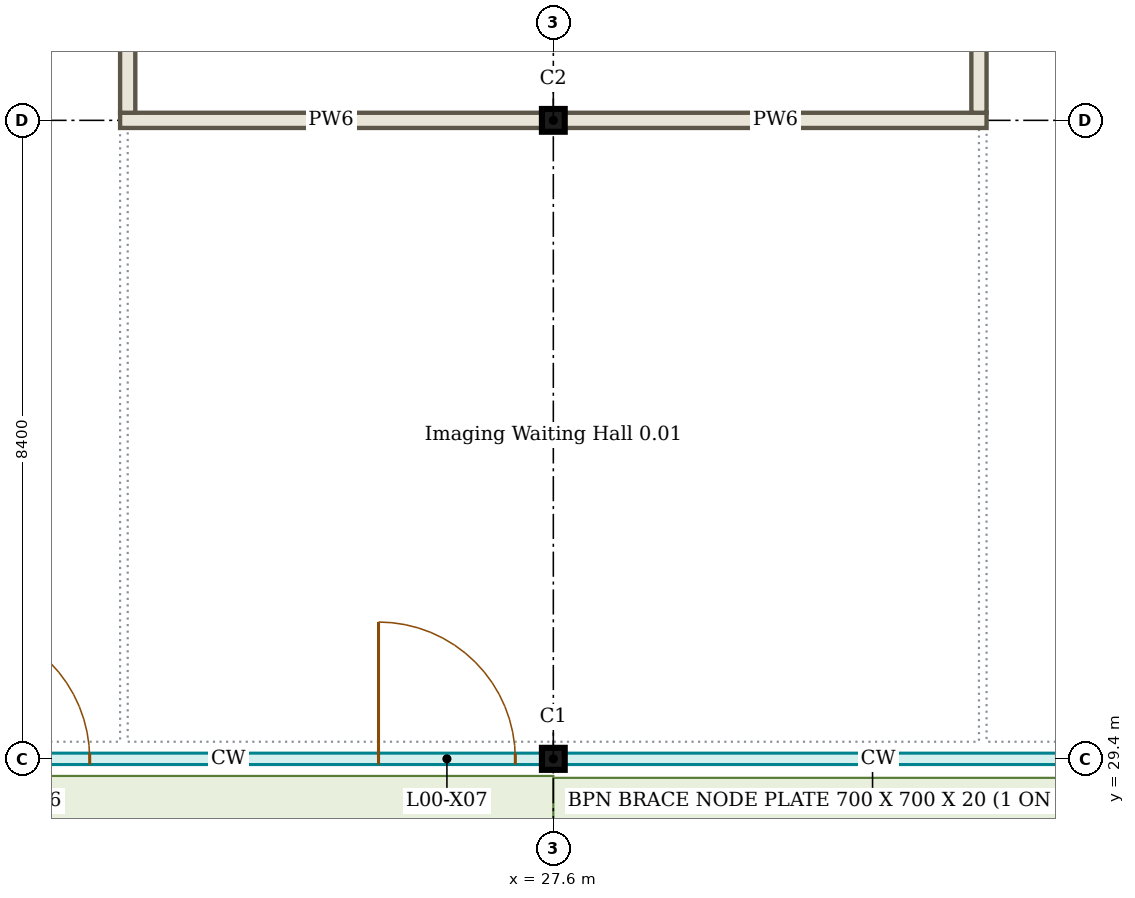
"""IFC4 building model, lengths in metres.
Left out: names, types, materials, properties, quantities, classifications, styles, units other than length and angle.
Written with IfcOpenShell. Run it as: python <this file> out.ifc"""

import sys

from ifc_helpers import new_model, si_unit, direction, frame, frame_2d, origin, origin_2d, place, context, subcontext, project, spatial, rectangle, i_section, extrude, element, save


model = new_model("IFC4")
c1 = context("Model", 3, precision=1e-05, world=origin(), true_north=direction((0.0, 1.0)))
c2 = subcontext(c1, "Body", "Model", "MODEL_VIEW")
j1 = project(units=[si_unit("LENGTHUNIT", "METRE"), si_unit("PLANEANGLEUNIT", "RADIAN")], contexts=[c1])
p1 = place(None, origin())
s1 = spatial("IfcSite", under=j1, at=p1, CompositionType="ELEMENT")
p2 = place(p1, origin())
s2 = spatial("IfcBuilding", under=s1, at=p2, CompositionType="ELEMENT")
p3 = place(p2, origin())
s3 = spatial("IfcBuildingStorey", under=s2, at=p3, CompositionType="ELEMENT", Elevation=0.0)
p4 = place(p3, frame((27.6, 29.4, 0.0), z_axis=(0.0, 0.0, 1.0), x_axis=(1.0, 0.0, 0.0)))
e1 = element("IfcColumn", 1, at=p4, inside=s3, PredefinedType="COLUMN", context=c2, shape_type="SweptSolid", body=[
    extrude(i_section(OverallWidth=0.3, OverallDepth=0.29, WebThickness=0.009, FlangeThickness=0.014, FilletRadius=0.027, at=origin_2d()), origin(), (0.0, 0.0, 1.0), 4.5),
])
p5 = place(p3, frame((27.6, 37.8, 0.0), z_axis=(0.0, 0.0, 1.0), x_axis=(1.0, 0.0, 0.0)))
e2 = element("IfcColumn", 2, at=p5, inside=s3, PredefinedType="COLUMN", context=c2, shape_type="SweptSolid", body=[
    extrude(i_section(OverallWidth=0.3, OverallDepth=0.3, WebThickness=0.011, FlangeThickness=0.019, FilletRadius=0.027, at=origin_2d()), origin(), (0.0, 0.0, 1.0), 4.5),
])
p6 = place(p3, frame((19.2, 29.24, 3.87), z_axis=(0.0, 0.0, 1.0), x_axis=(1.0, 0.0, 0.0)))
e3 = element("IfcWall", 3, at=p6, inside=s3, PredefinedType="SOLIDWALL", context=c2, shape_type="SweptSolid", body=[
    extrude(rectangle(XDim=8.4, YDim=0.13, at=frame_2d((4.2, 0.0))), origin(), (0.0, 0.0, 1.0), 0.63),
])
for number, where, z_axis, x_axis in (
    (4, (21.9, 37.8, 0.0), (0.0, 0.0, 1.0), (1.0, 0.0, 0.0)),
    (5, (27.75, 37.8, 0.0), (0.0, 0.0, 1.0), (1.0, 0.0, 0.0)),
):
    element("IfcWall", number, at=place(p3, frame(where, z_axis=z_axis, x_axis=x_axis)), inside=s3, PredefinedType="PARTITIONING", context=c2, shape_type="SweptSolid", body=[
        extrude(rectangle(XDim=5.55, YDim=0.2, at=frame_2d((2.775, 0.0))), origin(), (0.0, 0.0, 1.0), 3.8),
    ])
p7 = place(p3, frame((22.0, 37.9, 0.0), z_axis=(0.0, 0.0, 1.0), x_axis=(0.0, 1.0, 0.0)))
e6 = element("IfcWall", 6, at=p7, inside=s3, PredefinedType="PARTITIONING", context=c2, shape_type="SweptSolid", body=[
    extrude(rectangle(XDim=5.4, YDim=0.2, at=frame_2d((2.7, 0.0))), origin(), (0.0, 0.0, 1.0), 3.8),
])
p8 = place(p7, frame((2.1, 0.0, 0.0)))
e7 = element("IfcOpeningElement", 7, at=p8, cuts=e6, PredefinedType="OPENING", context=c2, shape_type="SweptSolid", body=[
    extrude(rectangle(XDim=1.2, YDim=2.1, at=frame_2d((0.6, 1.05))), frame((0.0, 0.11, 0.0), z_axis=(0.0, -1.0, 0.0), x_axis=(1.0, 0.0, 0.0)), (0.0, 0.0, 1.0), 0.22),
])
p9 = place(p3, frame((33.2, 37.9, 0.0), z_axis=(0.0, 0.0, 1.0), x_axis=(0.0, 1.0, 0.0)))
e8 = element("IfcWall", 8, at=p9, inside=s3, PredefinedType="PARTITIONING", context=c2, shape_type="SweptSolid", body=[
    extrude(rectangle(XDim=5.4, YDim=0.2, at=frame_2d((2.7, 0.0))), origin(), (0.0, 0.0, 1.0), 3.8),
])
p10 = place(p3, frame((19.2, 29.4, 0.0), z_axis=(0.0, 0.0, 1.0), x_axis=(1.0, 0.0, 0.0)))
p11 = place(p10, frame((0.5, 0.0, 0.0)))
p12 = place(p11, origin())
e9 = element("IfcDoor", 9, at=p12, inside=s3, OperationType="SINGLE_SWING_LEFT", PredefinedType="DOOR", context=c2, shape_type="SweptSolid", body=[
    extrude(rectangle(XDim=1.8, YDim=2.1, at=frame_2d((0.9, 1.05))), frame((0.0, 0.025, 0.0), z_axis=(0.0, -1.0, 0.0), x_axis=(1.0, 0.0, 0.0)), (0.0, 0.0, 1.0), 0.05),
])
p13 = place(p10, frame((6.1, 0.0, 0.0)))
p14 = place(p13, origin())
e10 = element("IfcDoor", 10, at=p14, inside=s3, OperationType="SINGLE_SWING_LEFT", PredefinedType="DOOR", context=c2, shape_type="SweptSolid", body=[
    extrude(rectangle(XDim=1.8, YDim=2.4, at=frame_2d((0.9, 1.2))), frame((0.0, 0.025, 0.0), z_axis=(0.0, -1.0, 0.0), x_axis=(1.0, 0.0, 0.0)), (0.0, 0.0, 1.0), 0.05),
])
save(model, sys.argv[1])
